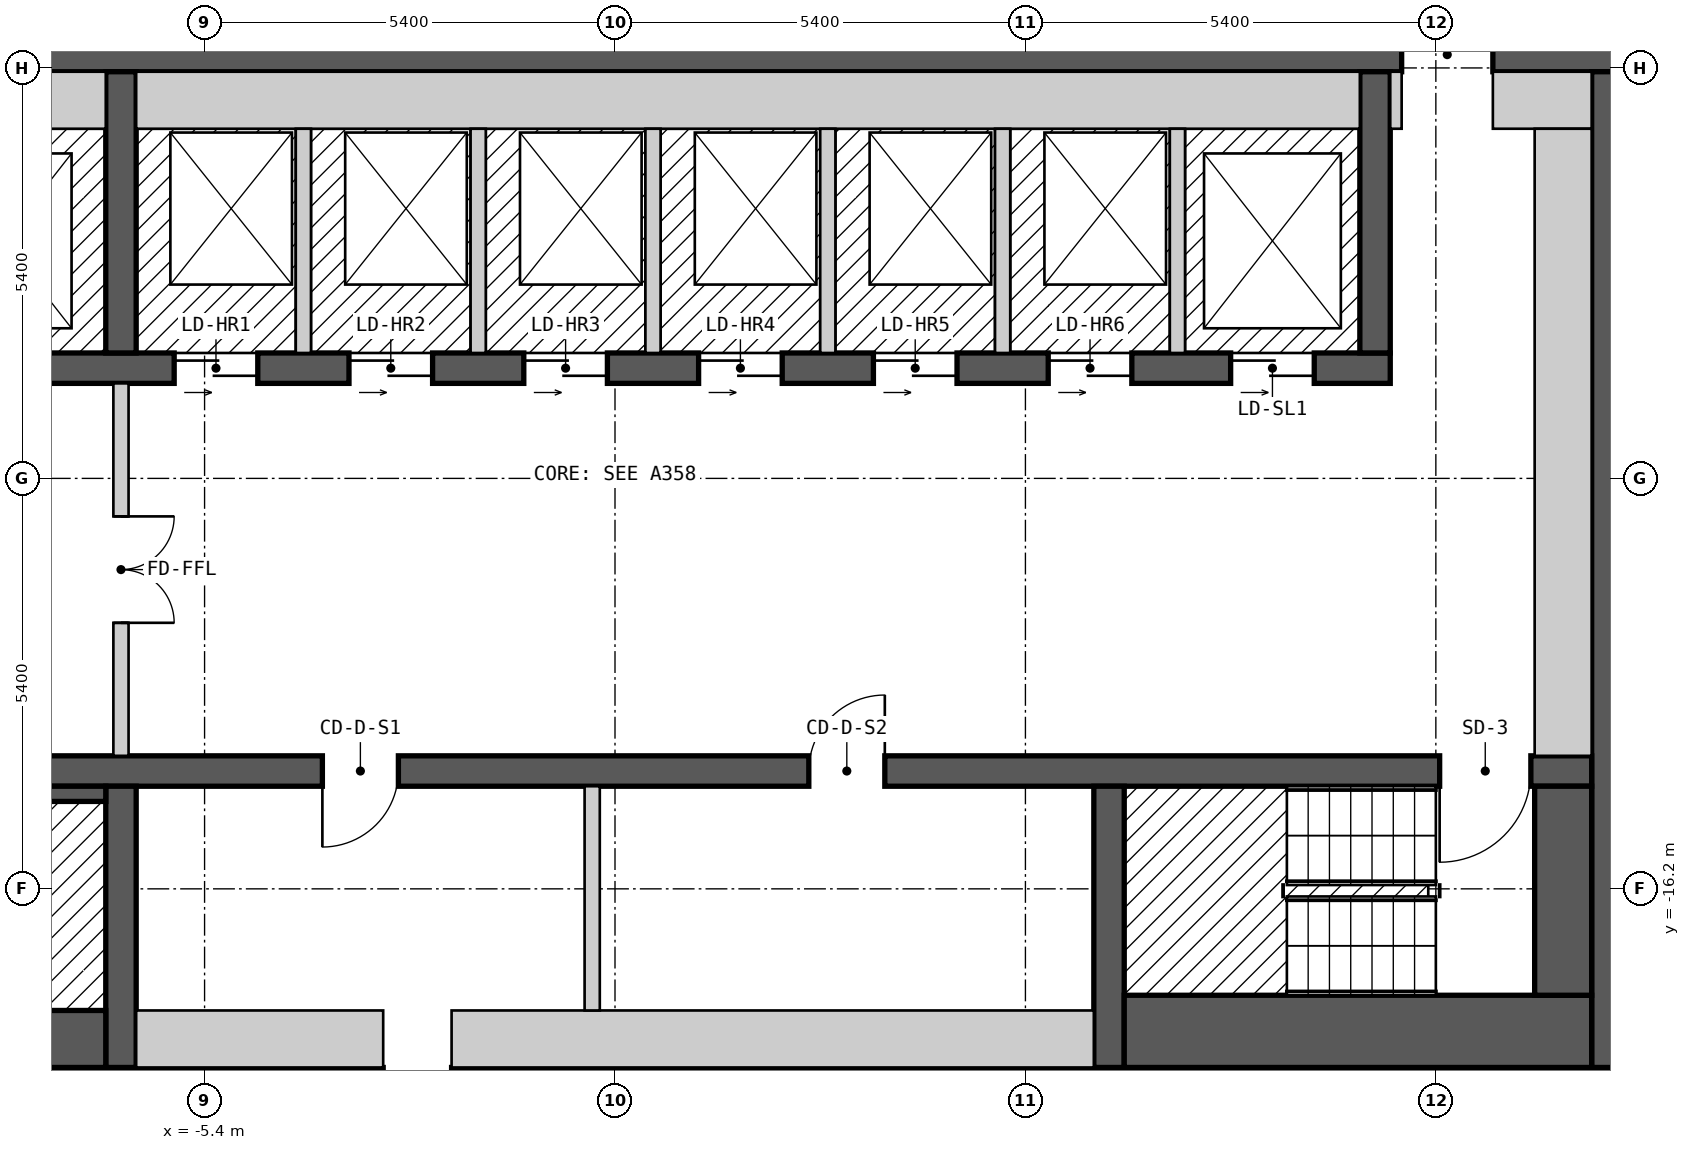
"""IFC4 building model, lengths in metres.
Left out: names, types, materials, properties, quantities, classifications, styles, units other than length and angle.
Written with IfcOpenShell. Run it as: python <this file> out.ifc"""

import sys

from ifc_helpers import new_model, si_unit, direction, frame, frame_2d, origin, place, context, subcontext, project, spatial, polyline, rectangle, outline, extrude, element, fill, save


model = new_model("IFC4")
c1 = context("Model", 3, precision=1e-05, world=origin(), true_north=direction((0.0, 1.0)))
c2 = subcontext(c1, "Body", "Model", "MODEL_VIEW")
j1 = project(units=[si_unit("LENGTHUNIT", "METRE"), si_unit("PLANEANGLEUNIT", "RADIAN")], contexts=[c1])
p1 = place(None, origin())
s1 = spatial("IfcSite", under=j1, at=p1, CompositionType="ELEMENT")
p2 = place(p1, origin())
s2 = spatial("IfcBuilding", under=s1, at=p2, CompositionType="ELEMENT")
p3 = place(p2, frame((0.0, 0.0, 211.8)))
s3 = spatial("IfcBuildingStorey", under=s2, at=p3, CompositionType="ELEMENT", Elevation=211.8)
p4 = place(p3, frame((-13.3, -18.775, 0.0), z_axis=(0.0, 0.0, 1.0), x_axis=(1.0, 0.0, 0.0)))
e1 = element("IfcWall", 1, at=p4, inside=s3, PredefinedType="SHEAR", context=c2, shape_type="SweptSolid", body=[
    extrude(rectangle(XDim=26.6, YDim=0.45, at=frame_2d((13.3, 0.0))), origin(), (0.0, 0.0, 1.0), 2.7),
])
p5 = place(p4, frame((10.25, 0.0, 0.0)))
e2 = element("IfcOpeningElement", 2, at=p5, cuts=e1, PredefinedType="OPENING", context=c2, shape_type="SweptSolid", body=[
    extrude(rectangle(XDim=0.9, YDim=2.1, at=frame_2d((0.45, 1.05))), frame((0.0, 0.235, 0.0), z_axis=(0.0, -1.0, 0.0), x_axis=(1.0, 0.0, 0.0)), (0.0, 0.0, 1.0), 0.47),
])
p6 = place(p3, frame((-13.3, -5.225, 0.0), z_axis=(0.0, 0.0, 1.0), x_axis=(1.0, 0.0, 0.0)))
e3 = element("IfcWall", 3, at=p6, inside=s3, PredefinedType="SHEAR", context=c2, shape_type="SweptSolid", body=[
    extrude(rectangle(XDim=26.6, YDim=0.45, at=frame_2d((13.3, 0.0))), origin(), (0.0, 0.0, 1.0), 2.7),
])
p7 = place(p6, frame((23.65, 0.0, 0.0)))
e4 = element("IfcOpeningElement", 4, at=p7, cuts=e3, PredefinedType="OPENING", context=c2, shape_type="SweptSolid", body=[
    extrude(rectangle(XDim=1.2, YDim=2.1, at=frame_2d((0.6, 1.05))), frame((0.0, 0.235, 0.0), z_axis=(0.0, -1.0, 0.0), x_axis=(1.0, 0.0, 0.0)), (0.0, 0.0, 1.0), 0.47),
])
p8 = place(p3, frame((13.075, -18.55, 0.0), z_axis=(0.0, 0.0, 1.0), x_axis=(0.0, 1.0, 0.0)))
e5 = element("IfcWall", 5, at=p8, inside=s3, PredefinedType="SHEAR", context=c2, shape_type="SweptSolid", body=[
    extrude(rectangle(XDim=13.1, YDim=0.45, at=frame_2d((6.55, 0.0))), origin(), (0.0, 0.0, 1.0), 2.7),
])
p9 = place(p3, frame((-12.85, -14.65, 0.0), z_axis=(0.0, 0.0, 1.0), x_axis=(1.0, 0.0, 0.0)))
e6 = element("IfcWall", 6, at=p9, inside=s3, PredefinedType="SHEAR", context=c2, shape_type="SweptSolid", body=[
    extrude(rectangle(XDim=25.7, YDim=0.4, at=frame_2d((12.85, 0.0))), origin(), (0.0, 0.0, 1.0), 2.7),
])
p10 = place(p9, frame((2.05, 0.0, 0.0), z_axis=(0.0, 0.0, 1.0), x_axis=(-1.0, 0.0, 0.0)))
e7 = element("IfcOpeningElement", 7, at=p10, cuts=e6, PredefinedType="OPENING", context=c2, shape_type="SweptSolid", body=[
    extrude(rectangle(XDim=1.2, YDim=2.1, at=frame_2d((0.6, 1.05))), frame((0.0, 0.21, 0.0), z_axis=(0.0, -1.0, 0.0), x_axis=(1.0, 0.0, 0.0)), (0.0, 0.0, 1.0), 0.42),
])
p11 = place(p9, frame((24.9, 0.0, 0.0), z_axis=(0.0, 0.0, 1.0), x_axis=(-1.0, 0.0, 0.0)))
e8 = element("IfcOpeningElement", 8, at=p11, cuts=e6, PredefinedType="OPENING", context=c2, shape_type="SweptSolid", body=[
    extrude(rectangle(XDim=1.2, YDim=2.1, at=frame_2d((0.6, 1.05))), frame((0.0, 0.21, 0.0), z_axis=(0.0, -1.0, 0.0), x_axis=(1.0, 0.0, 0.0)), (0.0, 0.0, 1.0), 0.42),
])
p12 = place(p9, frame((10.0, 0.0, 0.0), z_axis=(0.0, 0.0, 1.0), x_axis=(-1.0, 0.0, 0.0)))
e9 = element("IfcOpeningElement", 9, at=p12, cuts=e6, PredefinedType="OPENING", context=c2, shape_type="SweptSolid", body=[
    extrude(rectangle(XDim=1.0, YDim=2.1, at=frame_2d((0.5, 1.05))), frame((0.0, 0.21, 0.0), z_axis=(0.0, -1.0, 0.0), x_axis=(1.0, 0.0, 0.0)), (0.0, 0.0, 1.0), 0.42),
])
p13 = place(p9, frame((16.4, 0.0, 0.0), z_axis=(0.0, 0.0, 1.0), x_axis=(-1.0, 0.0, 0.0)))
e10 = element("IfcOpeningElement", 10, at=p13, cuts=e6, PredefinedType="OPENING", context=c2, shape_type="SweptSolid", body=[
    extrude(rectangle(XDim=1.0, YDim=2.1, at=frame_2d((0.5, 1.05))), frame((0.0, 0.21, 0.0), z_axis=(0.0, -1.0, 0.0), x_axis=(1.0, 0.0, 0.0)), (0.0, 0.0, 1.0), 0.42),
])
p14 = place(p3, frame((-12.85, -9.35, 0.0), z_axis=(0.0, 0.0, 1.0), x_axis=(1.0, 0.0, 0.0)))
e11 = element("IfcWall", 11, at=p14, inside=s3, PredefinedType="SHEAR", context=c2, shape_type="SweptSolid", body=[
    extrude(rectangle(XDim=23.05, YDim=0.4, at=frame_2d((11.525, 0.0))), origin(), (0.0, 0.0, 1.0), 2.7),
])
p15 = place(p14, frame((1.45, 0.0, 0.0)))
e12 = element("IfcOpeningElement", 12, at=p15, cuts=e11, PredefinedType="OPENING", context=c2, shape_type="SweptSolid", body=[
    extrude(rectangle(XDim=1.1, YDim=2.1, at=frame_2d((0.55, 1.05))), frame((0.0, 0.21, 0.0), z_axis=(0.0, -1.0, 0.0), x_axis=(1.0, 0.0, 0.0)), (0.0, 0.0, 1.0), 0.42),
])
p16 = place(p14, frame((4.25, 0.0, 0.0)))
e13 = element("IfcOpeningElement", 13, at=p16, cuts=e11, PredefinedType="OPENING", context=c2, shape_type="SweptSolid", body=[
    extrude(rectangle(XDim=1.1, YDim=2.1, at=frame_2d((0.55, 1.05))), frame((0.0, 0.21, 0.0), z_axis=(0.0, -1.0, 0.0), x_axis=(1.0, 0.0, 0.0)), (0.0, 0.0, 1.0), 0.42),
])
p17 = place(p14, frame((7.05, 0.0, 0.0)))
e14 = element("IfcOpeningElement", 14, at=p17, cuts=e11, PredefinedType="OPENING", context=c2, shape_type="SweptSolid", body=[
    extrude(rectangle(XDim=1.1, YDim=2.1, at=frame_2d((0.55, 1.05))), frame((0.0, 0.21, 0.0), z_axis=(0.0, -1.0, 0.0), x_axis=(1.0, 0.0, 0.0)), (0.0, 0.0, 1.0), 0.42),
])
p18 = place(p14, frame((9.35, 0.0, 0.0)))
e15 = element("IfcOpeningElement", 15, at=p18, cuts=e11, PredefinedType="OPENING", context=c2, shape_type="SweptSolid", body=[
    extrude(rectangle(XDim=1.1, YDim=2.1, at=frame_2d((0.55, 1.05))), frame((0.0, 0.21, 0.0), z_axis=(0.0, -1.0, 0.0), x_axis=(1.0, 0.0, 0.0)), (0.0, 0.0, 1.0), 0.42),
])
p19 = place(p14, frame((11.65, 0.0, 0.0)))
e16 = element("IfcOpeningElement", 16, at=p19, cuts=e11, PredefinedType="OPENING", context=c2, shape_type="SweptSolid", body=[
    extrude(rectangle(XDim=1.1, YDim=2.1, at=frame_2d((0.55, 1.05))), frame((0.0, 0.21, 0.0), z_axis=(0.0, -1.0, 0.0), x_axis=(1.0, 0.0, 0.0)), (0.0, 0.0, 1.0), 0.42),
])
p20 = place(p14, frame((13.95, 0.0, 0.0)))
e17 = element("IfcOpeningElement", 17, at=p20, cuts=e11, PredefinedType="OPENING", context=c2, shape_type="SweptSolid", body=[
    extrude(rectangle(XDim=1.1, YDim=2.1, at=frame_2d((0.55, 1.05))), frame((0.0, 0.21, 0.0), z_axis=(0.0, -1.0, 0.0), x_axis=(1.0, 0.0, 0.0)), (0.0, 0.0, 1.0), 0.42),
])
p21 = place(p14, frame((16.25, 0.0, 0.0)))
e18 = element("IfcOpeningElement", 18, at=p21, cuts=e11, PredefinedType="OPENING", context=c2, shape_type="SweptSolid", body=[
    extrude(rectangle(XDim=1.1, YDim=2.1, at=frame_2d((0.55, 1.05))), frame((0.0, 0.21, 0.0), z_axis=(0.0, -1.0, 0.0), x_axis=(1.0, 0.0, 0.0)), (0.0, 0.0, 1.0), 0.42),
])
p22 = place(p14, frame((18.55, 0.0, 0.0)))
e19 = element("IfcOpeningElement", 19, at=p22, cuts=e11, PredefinedType="OPENING", context=c2, shape_type="SweptSolid", body=[
    extrude(rectangle(XDim=1.1, YDim=2.1, at=frame_2d((0.55, 1.05))), frame((0.0, 0.21, 0.0), z_axis=(0.0, -1.0, 0.0), x_axis=(1.0, 0.0, 0.0)), (0.0, 0.0, 1.0), 0.42),
])
p23 = place(p14, frame((20.95, 0.0, 0.0)))
e20 = element("IfcOpeningElement", 20, at=p23, cuts=e11, PredefinedType="OPENING", context=c2, shape_type="SweptSolid", body=[
    extrude(rectangle(XDim=1.1, YDim=2.1, at=frame_2d((0.55, 1.05))), frame((0.0, 0.21, 0.0), z_axis=(0.0, -1.0, 0.0), x_axis=(1.0, 0.0, 0.0)), (0.0, 0.0, 1.0), 0.42),
])
for number, where, z_axis, x_axis in (
    (21, (-6.5, -18.55, 0.0), (0.0, 0.0, 1.0), (0.0, 1.0, 0.0)),
    (22, (6.5, -18.55, 0.0), (0.0, 0.0, 1.0), (0.0, 1.0, 0.0)),
    (23, (-6.5, -9.15, 0.0), (0.0, 0.0, 1.0), (0.0, 1.0, 0.0)),
    (24, (10.0, -9.15, 0.0), (0.0, 0.0, 1.0), (0.0, 1.0, 0.0)),
):
    element("IfcWall", number, at=place(p3, frame(where, z_axis=z_axis, x_axis=x_axis)), inside=s3, PredefinedType="SHEAR", context=c2, shape_type="SweptSolid", body=[
        extrude(rectangle(XDim=3.7, YDim=0.4, at=frame_2d((1.85, 0.0))), origin(), (0.0, 0.0, 1.0), 2.7),
    ])
p24 = place(p3, frame((11.01, -20.87, 0.0), z_axis=(0.0, 0.0, 1.0), x_axis=(0.866022959057, 0.500004234368, 0.0)))
e25 = element("IfcWall", 25, at=p24, inside=s3, PredefinedType="SOLIDWALL", context=c2, shape_type="SweptSolid", body=[
    extrude(outline(polyline([(0.0, -0.15), (5.0, -0.15), (4.92, 0.15), (0.08, 0.15), (0.0, -0.15)])), origin(), (0.0, 0.0, 1.0), 2.7),
])
p25 = place(p24, frame((0.65, 0.0, 0.15)))
e26 = element("IfcOpeningElement", 26, at=p25, cuts=e25, PredefinedType="OPENING", context=c2, shape_type="SweptSolid", body=[
    extrude(rectangle(XDim=1.2, YDim=2.1, at=frame_2d((0.6, 1.05))), frame((0.0, 0.16, 0.0), z_axis=(0.0, -1.0, 0.0), x_axis=(1.0, 0.0, 0.0)), (0.0, 0.0, 1.0), 0.32),
])
for number, where, z_axis, x_axis in (
    (27, (-12.1, -18.175, 0.0), (0.0, 0.0, 1.0), (1.0, 0.0, 0.0)),
    (28, (-12.1, -5.825, 0.0), (0.0, 0.0, 1.0), (1.0, 0.0, 0.0)),
):
    element("IfcWall", number, at=place(p3, frame(where, z_axis=z_axis, x_axis=x_axis)), inside=s3, PredefinedType="SOLIDWALL", context=c2, shape_type="SweptSolid", body=[
        extrude(rectangle(XDim=5.4, YDim=0.75, at=frame_2d((2.7, 0.0))), origin(), (0.0, 0.0, 1.0), 2.7),
    ])
p26 = place(p3, frame((-10.8, -14.95, 0.0), z_axis=(0.0, 0.0, 1.0), x_axis=(1.0, 0.0, 0.0)))
e29 = element("IfcWall", 29, at=p26, inside=s3, PredefinedType="SOLIDWALL", context=c2, shape_type="SweptSolid", body=[
    extrude(rectangle(XDim=4.1, YDim=0.2, at=frame_2d((2.05, 0.0))), origin(), (0.0, 0.0, 1.0), 2.7),
])
p27 = place(p3, frame((-6.5, -14.45, 0.0), z_axis=(0.0, 0.0, 1.0), x_axis=(0.0, 1.0, 0.0)))
e30 = element("IfcWall", 30, at=p27, inside=s3, PredefinedType="PARTITIONING", context=c2, shape_type="SweptSolid", body=[
    extrude(rectangle(XDim=4.9, YDim=0.2, at=frame_2d((2.45, 0.0))), origin(), (0.0, 0.0, 1.0), 2.7),
])
p28 = place(p27, frame((3.15, 0.0, 0.0), z_axis=(0.0, 0.0, 1.0), x_axis=(-1.0, 0.0, 0.0)))
e31 = element("IfcOpeningElement", 31, at=p28, cuts=e30, PredefinedType="OPENING", context=c2, shape_type="SweptSolid", body=[
    extrude(rectangle(XDim=1.4, YDim=2.1, at=frame_2d((0.7, 1.05))), frame((0.0, 0.11, 0.0), z_axis=(0.0, -1.0, 0.0), x_axis=(1.0, 0.0, 0.0)), (0.0, 0.0, 1.0), 0.22),
])
p29 = place(p3, frame((-6.3, -18.175, 0.0), z_axis=(0.0, 0.0, 1.0), x_axis=(1.0, 0.0, 0.0)))
e32 = element("IfcWall", 32, at=p29, inside=s3, PredefinedType="PARTITIONING", context=c2, shape_type="SweptSolid", body=[
    extrude(rectangle(XDim=3.25, YDim=0.75, at=frame_2d((1.625, 0.0))), origin(), (0.0, 0.0, 1.0), 2.7),
])
p30 = place(p3, frame((-6.3, -5.825, 0.0), z_axis=(0.0, 0.0, 1.0), x_axis=(1.0, 0.0, 0.0)))
e33 = element("IfcWall", 33, at=p30, inside=s3, PredefinedType="SOLIDWALL", context=c2, shape_type="SweptSolid", body=[
    extrude(rectangle(XDim=16.1, YDim=0.75, at=frame_2d((8.05, 0.0))), origin(), (0.0, 0.0, 1.0), 2.7),
])
p31 = place(p3, frame((-4.1, -9.15, 0.0), z_axis=(0.0, 0.0, 1.0), x_axis=(0.0, 1.0, 0.0)))
e34 = element("IfcWall", 34, at=p31, inside=s3, PredefinedType="SOLIDWALL", context=c2, shape_type="SweptSolid", body=[
    extrude(rectangle(XDim=2.95, YDim=0.2, at=frame_2d((1.475, 0.0))), origin(), (0.0, 0.0, 1.0), 2.7),
])
p32 = place(p3, frame((-2.15, -18.175, 0.0), z_axis=(0.0, 0.0, 1.0), x_axis=(1.0, 0.0, 0.0)))
e35 = element("IfcWall", 35, at=p32, inside=s3, PredefinedType="PARTITIONING", context=c2, shape_type="SweptSolid", body=[
    extrude(rectangle(XDim=8.45, YDim=0.75, at=frame_2d((4.225, 0.0))), origin(), (0.0, 0.0, 1.0), 2.7),
])
p33 = place(p3, frame((-1.8, -9.15, 0.0), z_axis=(0.0, 0.0, 1.0), x_axis=(0.0, 1.0, 0.0)))
e36 = element("IfcWall", 36, at=p33, inside=s3, PredefinedType="SOLIDWALL", context=c2, shape_type="SweptSolid", body=[
    extrude(rectangle(XDim=2.95, YDim=0.2, at=frame_2d((1.475, 0.0))), origin(), (0.0, 0.0, 1.0), 2.7),
])
p34 = place(p3, frame((-0.3, -17.8, 0.0), z_axis=(0.0, 0.0, 1.0), x_axis=(0.0, 1.0, 0.0)))
e37 = element("IfcWall", 37, at=p34, inside=s3, PredefinedType="PARTITIONING", context=c2, shape_type="SweptSolid", body=[
    extrude(rectangle(XDim=2.95, YDim=0.2, at=frame_2d((1.475, 0.0))), origin(), (0.0, 0.0, 1.0), 2.7),
])
for number, where, z_axis, x_axis in (
    (38, (0.5, -9.15, 0.0), (0.0, 0.0, 1.0), (0.0, 1.0, 0.0)),
    (39, (2.8, -9.15, 0.0), (0.0, 0.0, 1.0), (0.0, 1.0, 0.0)),
    (40, (5.1, -9.15, 0.0), (0.0, 0.0, 1.0), (0.0, 1.0, 0.0)),
):
    element("IfcWall", number, at=place(p3, frame(where, z_axis=z_axis, x_axis=x_axis)), inside=s3, PredefinedType="SOLIDWALL", context=c2, shape_type="SweptSolid", body=[
        extrude(rectangle(XDim=2.95, YDim=0.2, at=frame_2d((1.475, 0.0))), origin(), (0.0, 0.0, 1.0), 2.7),
    ])
p35 = place(p3, frame((6.7, -18.075, 0.0), z_axis=(0.0, 0.0, 1.0), x_axis=(1.0, 0.0, 0.0)))
e41 = element("IfcWall", 41, at=p35, inside=s3, PredefinedType="SOLIDWALL", context=c2, shape_type="SweptSolid", body=[
    extrude(rectangle(XDim=6.15, YDim=0.95, at=frame_2d((3.075, 0.0))), origin(), (0.0, 0.0, 1.0), 2.7),
])
p36 = place(p3, frame((7.4, -9.15, 0.0), z_axis=(0.0, 0.0, 1.0), x_axis=(0.0, 1.0, 0.0)))
e42 = element("IfcWall", 42, at=p36, inside=s3, PredefinedType="SOLIDWALL", context=c2, shape_type="SweptSolid", body=[
    extrude(rectangle(XDim=2.95, YDim=0.2, at=frame_2d((1.475, 0.0))), origin(), (0.0, 0.0, 1.0), 2.7),
])
p37 = place(p3, frame((10.275, -6.2, 0.0), z_axis=(0.0, 0.0, 1.0), x_axis=(0.0, 1.0, 0.0)))
e43 = element("IfcWall", 43, at=p37, inside=s3, PredefinedType="PARTITIONING", context=c2, shape_type="SweptSolid", body=[
    extrude(rectangle(XDim=0.75, YDim=0.15, at=frame_2d((0.375, 0.0))), origin(), (0.0, 0.0, 1.0), 2.7),
])
p38 = place(p3, frame((11.55, -5.825, 0.0), z_axis=(0.0, 0.0, 1.0), x_axis=(1.0, 0.0, 0.0)))
e44 = element("IfcWall", 44, at=p38, inside=s3, PredefinedType="PARTITIONING", context=c2, shape_type="SweptSolid", body=[
    extrude(rectangle(XDim=1.3, YDim=0.75, at=frame_2d((0.65, 0.0))), origin(), (0.0, 0.0, 1.0), 2.7),
])
p39 = place(p3, frame((12.475, -17.6, 0.0), z_axis=(0.0, 0.0, 1.0), x_axis=(0.0, 1.0, 0.0)))
e45 = element("IfcWall", 45, at=p39, inside=s3, PredefinedType="SOLIDWALL", context=c2, shape_type="SweptSolid", body=[
    extrude(rectangle(XDim=2.75, YDim=0.75, at=frame_2d((1.375, 0.0))), origin(), (0.0, 0.0, 1.0), 2.7),
])
p40 = place(p3, frame((12.475, -14.45, 0.0), z_axis=(0.0, 0.0, 1.0), x_axis=(0.0, 1.0, 0.0)))
e46 = element("IfcWall", 46, at=p40, inside=s3, PredefinedType="PARTITIONING", context=c2, shape_type="SweptSolid", body=[
    extrude(rectangle(XDim=8.25, YDim=0.75, at=frame_2d((4.125, 0.0))), origin(), (0.0, 0.0, 1.0), 2.7),
])
p41 = place(p17, origin())
e47 = element("IfcDoor", 47, at=p41, inside=s3, OperationType="DOUBLE_DOOR_SLIDING", PredefinedType="DOOR", context=c2, shape_type="SweptSolid", body=[
    extrude(rectangle(XDim=1.1, YDim=2.1, at=frame_2d((0.55, 1.05))), frame((0.0, 0.025, 0.0), z_axis=(0.0, -1.0, 0.0), x_axis=(1.0, 0.0, 0.0)), (0.0, 0.0, 1.0), 0.05),
])
fill(e14, e47)
p42 = place(p18, origin())
e48 = element("IfcDoor", 48, at=p42, inside=s3, OperationType="DOUBLE_DOOR_SLIDING", PredefinedType="DOOR", context=c2, shape_type="SweptSolid", body=[
    extrude(rectangle(XDim=1.1, YDim=2.1, at=frame_2d((0.55, 1.05))), frame((0.0, 0.025, 0.0), z_axis=(0.0, -1.0, 0.0), x_axis=(1.0, 0.0, 0.0)), (0.0, 0.0, 1.0), 0.05),
])
fill(e15, e48)
p43 = place(p19, origin())
e49 = element("IfcDoor", 49, at=p43, inside=s3, OperationType="DOUBLE_DOOR_SLIDING", PredefinedType="DOOR", context=c2, shape_type="SweptSolid", body=[
    extrude(rectangle(XDim=1.1, YDim=2.1, at=frame_2d((0.55, 1.05))), frame((0.0, 0.025, 0.0), z_axis=(0.0, -1.0, 0.0), x_axis=(1.0, 0.0, 0.0)), (0.0, 0.0, 1.0), 0.05),
])
fill(e16, e49)
p44 = place(p20, origin())
e50 = element("IfcDoor", 50, at=p44, inside=s3, OperationType="DOUBLE_DOOR_SLIDING", PredefinedType="DOOR", context=c2, shape_type="SweptSolid", body=[
    extrude(rectangle(XDim=1.1, YDim=2.1, at=frame_2d((0.55, 1.05))), frame((0.0, 0.025, 0.0), z_axis=(0.0, -1.0, 0.0), x_axis=(1.0, 0.0, 0.0)), (0.0, 0.0, 1.0), 0.05),
])
fill(e17, e50)
p45 = place(p21, origin())
e51 = element("IfcDoor", 51, at=p45, inside=s3, OperationType="DOUBLE_DOOR_SLIDING", PredefinedType="DOOR", context=c2, shape_type="SweptSolid", body=[
    extrude(rectangle(XDim=1.1, YDim=2.1, at=frame_2d((0.55, 1.05))), frame((0.0, 0.025, 0.0), z_axis=(0.0, -1.0, 0.0), x_axis=(1.0, 0.0, 0.0)), (0.0, 0.0, 1.0), 0.05),
])
fill(e18, e51)
p46 = place(p22, origin())
e52 = element("IfcDoor", 52, at=p46, inside=s3, OperationType="DOUBLE_DOOR_SLIDING", PredefinedType="DOOR", context=c2, shape_type="SweptSolid", body=[
    extrude(rectangle(XDim=1.1, YDim=2.1, at=frame_2d((0.55, 1.05))), frame((0.0, 0.025, 0.0), z_axis=(0.0, -1.0, 0.0), x_axis=(1.0, 0.0, 0.0)), (0.0, 0.0, 1.0), 0.05),
])
fill(e19, e52)
p47 = place(p23, origin())
e53 = element("IfcDoor", 53, at=p47, inside=s3, OperationType="DOUBLE_DOOR_SLIDING", PredefinedType="DOOR", context=c2, shape_type="SweptSolid", body=[
    extrude(rectangle(XDim=1.1, YDim=2.1, at=frame_2d((0.55, 1.05))), frame((0.0, 0.025, 0.0), z_axis=(0.0, -1.0, 0.0), x_axis=(1.0, 0.0, 0.0)), (0.0, 0.0, 1.0), 0.05),
])
fill(e20, e53)
p48 = place(p11, origin())
e54 = element("IfcDoor", 54, at=p48, inside=s3, OperationType="SINGLE_SWING_RIGHT", PredefinedType="DOOR", context=c2, shape_type="SweptSolid", body=[
    extrude(rectangle(XDim=1.2, YDim=2.1, at=frame_2d((0.6, 1.05))), frame((0.0, 0.025, 0.0), z_axis=(0.0, -1.0, 0.0), x_axis=(1.0, 0.0, 0.0)), (0.0, 0.0, 1.0), 0.05),
])
fill(e8, e54)
p49 = place(p28, origin())
e55 = element("IfcDoor", 55, at=p49, inside=s3, OperationType="DOUBLE_DOOR_SINGLE_SWING", PredefinedType="DOOR", context=c2, shape_type="SweptSolid", body=[
    extrude(rectangle(XDim=1.4, YDim=2.1, at=frame_2d((0.7, 1.05))), frame((0.0, 0.025, 0.0), z_axis=(0.0, -1.0, 0.0), x_axis=(1.0, 0.0, 0.0)), (0.0, 0.0, 1.0), 0.05),
])
fill(e31, e55)
p50 = place(p7, origin())
e56 = element("IfcDoor", 56, at=p50, inside=s3, OperationType="DOUBLE_DOOR_SINGLE_SWING", PredefinedType="DOOR", context=c2, shape_type="SweptSolid", body=[
    extrude(rectangle(XDim=1.2, YDim=2.1, at=frame_2d((0.6, 1.05))), frame((0.0, 0.025, 0.0), z_axis=(0.0, -1.0, 0.0), x_axis=(1.0, 0.0, 0.0)), (0.0, 0.0, 1.0), 0.05),
])
fill(e4, e56)
p51 = place(p12, origin())
e57 = element("IfcDoor", 57, at=p51, inside=s3, OperationType="SINGLE_SWING_RIGHT", PredefinedType="DOOR", context=c2, shape_type="SweptSolid", body=[
    extrude(rectangle(XDim=1.0, YDim=2.1, at=frame_2d((0.5, 1.05))), frame((0.0, 0.025, 0.0), z_axis=(0.0, -1.0, 0.0), x_axis=(1.0, 0.0, 0.0)), (0.0, 0.0, 1.0), 0.05),
])
fill(e9, e57)
p52 = place(p13, origin())
e58 = element("IfcDoor", 58, at=p52, inside=s3, OperationType="SINGLE_SWING_LEFT", PredefinedType="DOOR", context=c2, shape_type="SweptSolid", body=[
    extrude(rectangle(XDim=1.0, YDim=2.1, at=frame_2d((0.5, 1.05))), frame((0.0, 0.025, 0.0), z_axis=(0.0, -1.0, 0.0), x_axis=(1.0, 0.0, 0.0)), (0.0, 0.0, 1.0), 0.05),
])
fill(e10, e58)
save(model, sys.argv[1])
